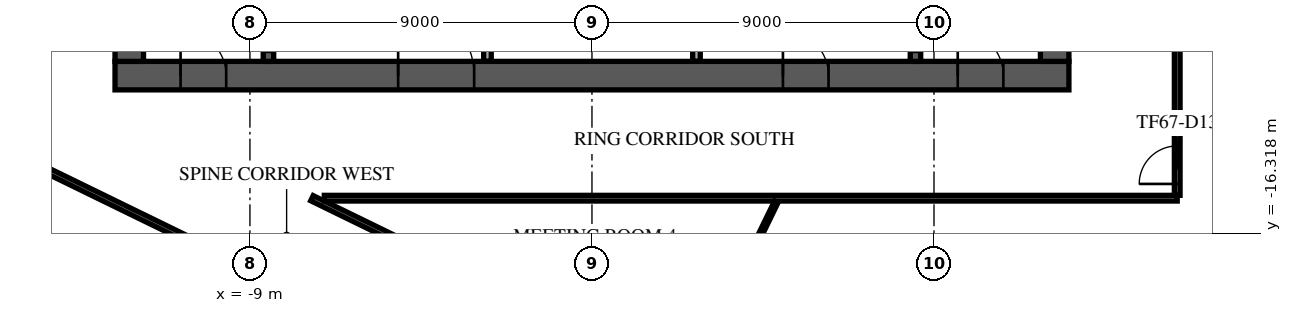
"""IFC4 building model, lengths in metres.
Left out: names, types, materials, properties, quantities, classifications, styles, units other than length and angle.
Written with IfcOpenShell. Run it as: python <this file> out.ifc"""

import sys

from ifc_helpers import new_model, si_unit, direction, frame, frame_2d, origin, place, context, subcontext, project, spatial, rectangle, extrude, element, fill, save


model = new_model("IFC4")
c1 = context("Model", 3, precision=1e-05, world=origin(), true_north=direction((0.0, 1.0)))
c2 = subcontext(c1, "Body", "Model", "MODEL_VIEW")
j1 = project(units=[si_unit("LENGTHUNIT", "METRE"), si_unit("PLANEANGLEUNIT", "RADIAN")], contexts=[c1])
p1 = place(None, origin())
s1 = spatial("IfcSite", under=j1, at=p1, CompositionType="ELEMENT")
p2 = place(p1, origin())
s2 = spatial("IfcBuilding", under=s1, at=p2, CompositionType="ELEMENT")
p3 = place(p2, frame((0.0, 0.0, 282.9)))
s3 = spatial("IfcBuildingStorey", under=s2, at=p3, CompositionType="ELEMENT", Elevation=282.9)
p4 = place(p3, frame((-12.55, -12.175, 0.0), z_axis=(0.0, 0.0, 1.0), x_axis=(1.0, 0.0, 0.0)))
e1 = element("IfcWall", 1, at=p4, inside=s3, PredefinedType="SHEAR", context=c2, shape_type="SweptSolid", body=[
    extrude(rectangle(XDim=25.1, YDim=0.75, at=frame_2d((12.55, 0.0))), origin(), (0.0, 0.0, 1.0), 3.64),
])
p5 = place(p4, frame((7.45, 0.0, 0.0)))
e2 = element("IfcOpeningElement", 2, at=p5, cuts=e1, PredefinedType="OPENING", context=c2, shape_type="SweptSolid", body=[
    extrude(rectangle(XDim=2.0, YDim=2.1, at=frame_2d((1.0, 1.05))), frame((0.0, 0.385, 0.0), z_axis=(0.0, -1.0, 0.0), x_axis=(1.0, 0.0, 0.0)), (0.0, 0.0, 1.0), 0.77),
])
p6 = place(p4, frame((17.575, 0.0, 0.0)))
e3 = element("IfcOpeningElement", 3, at=p6, cuts=e1, PredefinedType="OPENING", context=c2, shape_type="SweptSolid", body=[
    extrude(rectangle(XDim=1.2, YDim=2.1, at=frame_2d((0.6, 1.05))), frame((0.0, 0.385, 0.0), z_axis=(0.0, -1.0, 0.0), x_axis=(1.0, 0.0, 0.0)), (0.0, 0.0, 1.0), 0.77),
])
p7 = place(p4, frame((1.725, 0.0, 0.0)))
e4 = element("IfcOpeningElement", 4, at=p7, cuts=e1, PredefinedType="OPENING", context=c2, shape_type="SweptSolid", body=[
    extrude(rectangle(XDim=1.2, YDim=2.1, at=frame_2d((0.6, 1.05))), frame((0.0, 0.385, 0.0), z_axis=(0.0, -1.0, 0.0), x_axis=(1.0, 0.0, 0.0)), (0.0, 0.0, 1.0), 0.77),
])
p8 = place(p4, frame((22.175, 0.0, 0.0)))
e5 = element("IfcOpeningElement", 5, at=p8, cuts=e1, PredefinedType="OPENING", context=c2, shape_type="SweptSolid", body=[
    extrude(rectangle(XDim=1.2, YDim=2.1, at=frame_2d((0.6, 1.05))), frame((0.0, 0.385, 0.0), z_axis=(0.0, -1.0, 0.0), x_axis=(1.0, 0.0, 0.0)), (0.0, 0.0, 1.0), 0.77),
])
p9 = place(p3, frame((12.175, -11.8, 0.0), z_axis=(0.0, 0.0, 1.0), x_axis=(0.0, 1.0, 0.0)))
e6 = element("IfcWall", 6, at=p9, inside=s3, PredefinedType="SHEAR", context=c2, shape_type="SweptSolid", body=[
    extrude(rectangle(XDim=23.6, YDim=0.75, at=frame_2d((11.8, 0.0))), origin(), (0.0, 0.0, 1.0), 3.64),
])
p10 = place(p9, frame((10.6, 0.0, 0.0)))
e7 = element("IfcOpeningElement", 7, at=p10, cuts=e6, PredefinedType="OPENING", context=c2, shape_type="SweptSolid", body=[
    extrude(rectangle(XDim=2.4, YDim=2.4, at=frame_2d((1.2, 1.2))), frame((0.0, 0.385, 0.0), z_axis=(0.0, -1.0, 0.0), x_axis=(1.0, 0.0, 0.0)), (0.0, 0.0, 1.0), 0.77),
])
p11 = place(p3, frame((-12.175, -11.8, 0.0), z_axis=(0.0, 0.0, 1.0), x_axis=(0.0, 1.0, 0.0)))
e8 = element("IfcWall", 8, at=p11, inside=s3, PredefinedType="SHEAR", context=c2, shape_type="SweptSolid", body=[
    extrude(rectangle(XDim=23.6, YDim=0.75, at=frame_2d((11.8, 0.0))), origin(), (0.0, 0.0, 1.0), 3.64),
])
p12 = place(p11, frame((10.6, 0.0, 0.0)))
e9 = element("IfcOpeningElement", 9, at=p12, cuts=e8, PredefinedType="OPENING", context=c2, shape_type="SweptSolid", body=[
    extrude(rectangle(XDim=2.4, YDim=2.4, at=frame_2d((1.2, 1.2))), frame((0.0, 0.385, 0.0), z_axis=(0.0, -1.0, 0.0), x_axis=(1.0, 0.0, 0.0)), (0.0, 0.0, 1.0), 0.77),
])
p13 = place(p3, frame((-8.512, -4.55, 0.0), z_axis=(0.0, 0.0, 1.0), x_axis=(0.0, -1.0, 0.0)))
e10 = element("IfcWall", 10, at=p13, inside=s3, PredefinedType="SOLIDWALL", context=c2, shape_type="SweptSolid", body=[
    extrude(rectangle(XDim=7.25, YDim=0.275, at=frame_2d((3.625, 0.0))), origin(), (0.0, 0.0, 1.0), 3.64),
])
p14 = place(p13, frame((6.0, 0.0, 0.0)))
e11 = element("IfcOpeningElement", 11, at=p14, cuts=e10, PredefinedType="OPENING", context=c2, shape_type="SweptSolid", body=[
    extrude(rectangle(XDim=1.0, YDim=2.1, at=frame_2d((0.5, 1.05))), frame((0.0, 0.147, 0.0), z_axis=(0.0, -1.0, 0.0), x_axis=(1.0, 0.0, 0.0)), (0.0, 0.0, 1.0), 0.295),
])
p15 = place(p3, frame((8.512, -4.55, 0.0), z_axis=(0.0, 0.0, 1.0), x_axis=(0.0, -1.0, 0.0)))
e12 = element("IfcWall", 12, at=p15, inside=s3, PredefinedType="SOLIDWALL", context=c2, shape_type="SweptSolid", body=[
    extrude(rectangle(XDim=7.25, YDim=0.275, at=frame_2d((3.625, 0.0))), origin(), (0.0, 0.0, 1.0), 3.64),
])
p16 = place(p15, frame((6.0, 0.0, 0.0)))
e13 = element("IfcOpeningElement", 13, at=p16, cuts=e12, PredefinedType="OPENING", context=c2, shape_type="SweptSolid", body=[
    extrude(rectangle(XDim=1.0, YDim=2.1, at=frame_2d((0.5, 1.05))), frame((0.0, 0.147, 0.0), z_axis=(0.0, -1.0, 0.0), x_axis=(1.0, 0.0, 0.0)), (0.0, 0.0, 1.0), 0.295),
])
p17 = place(p3, frame((-2.75, -11.795, 0.0), z_axis=(0.0, 0.0, 1.0), x_axis=(0.0, 1.0, 0.0)))
e14 = element("IfcWall", 14, at=p17, inside=s3, PredefinedType="PARTITIONING", context=c2, shape_type="SweptSolid", body=[
    extrude(rectangle(XDim=2.99, YDim=0.2, at=frame_2d((1.495, 0.0))), origin(), (0.0, 0.0, 1.0), 3.64),
])
p18 = place(p17, frame((0.657, 0.0, 0.0)))
e15 = element("IfcOpeningElement", 15, at=p18, cuts=e14, PredefinedType="OPENING", context=c2, shape_type="SweptSolid", body=[
    extrude(rectangle(XDim=1.8, YDim=2.1, at=frame_2d((0.9, 1.05))), frame((0.0, 0.11, 0.0), z_axis=(0.0, -1.0, 0.0), x_axis=(1.0, 0.0, 0.0)), (0.0, 0.0, 1.0), 0.22),
])
p19 = place(p3, frame((2.75, -11.795, 0.0), z_axis=(0.0, 0.0, 1.0), x_axis=(0.0, 1.0, 0.0)))
e16 = element("IfcWall", 16, at=p19, inside=s3, PredefinedType="PARTITIONING", context=c2, shape_type="SweptSolid", body=[
    extrude(rectangle(XDim=2.99, YDim=0.2, at=frame_2d((1.495, 0.0))), origin(), (0.0, 0.0, 1.0), 3.64),
])
p20 = place(p3, frame((-10.292, 32.278, 0.0), z_axis=(0.0, 0.0, 1.0), x_axis=(-0.438370550468, -0.898794337144, 0.0)))
e17 = element("IfcWall", 17, at=p20, inside=s3, PredefinedType="STANDARD", context=c2, shape_type="SweptSolid", body=[
    extrude(rectangle(XDim=48.843, YDim=0.6, at=frame_2d((24.421, 0.0))), origin(), (0.0, 0.0, 1.0), 3.64),
])
p21 = place(p20, frame((1.22, 0.0, 0.9)))
e18 = element("IfcOpeningElement", 18, at=p21, cuts=e17, PredefinedType="OPENING", context=c2, shape_type="SweptSolid", body=[
    extrude(rectangle(XDim=2.0, YDim=2.1, at=frame_2d((1.0, 1.05))), frame((0.0, 0.31, 0.0), z_axis=(0.0, -1.0, 0.0), x_axis=(1.0, 0.0, 0.0)), (0.0, 0.0, 1.0), 0.62),
])
p22 = place(p20, frame((5.66, 0.0, 0.9)))
e19 = element("IfcOpeningElement", 19, at=p22, cuts=e17, PredefinedType="OPENING", context=c2, shape_type="SweptSolid", body=[
    extrude(rectangle(XDim=2.0, YDim=2.1, at=frame_2d((1.0, 1.05))), frame((0.0, 0.31, 0.0), z_axis=(0.0, -1.0, 0.0), x_axis=(1.0, 0.0, 0.0)), (0.0, 0.0, 1.0), 0.62),
])
p23 = place(p20, frame((10.101, 0.0, 0.9)))
e20 = element("IfcOpeningElement", 20, at=p23, cuts=e17, PredefinedType="OPENING", context=c2, shape_type="SweptSolid", body=[
    extrude(rectangle(XDim=2.0, YDim=2.1, at=frame_2d((1.0, 1.05))), frame((0.0, 0.31, 0.0), z_axis=(0.0, -1.0, 0.0), x_axis=(1.0, 0.0, 0.0)), (0.0, 0.0, 1.0), 0.62),
])
p24 = place(p20, frame((14.541, 0.0, 0.9)))
e21 = element("IfcOpeningElement", 21, at=p24, cuts=e17, PredefinedType="OPENING", context=c2, shape_type="SweptSolid", body=[
    extrude(rectangle(XDim=2.0, YDim=2.1, at=frame_2d((1.0, 1.05))), frame((0.0, 0.31, 0.0), z_axis=(0.0, -1.0, 0.0), x_axis=(1.0, 0.0, 0.0)), (0.0, 0.0, 1.0), 0.62),
])
p25 = place(p20, frame((18.981, 0.0, 0.9)))
e22 = element("IfcOpeningElement", 22, at=p25, cuts=e17, PredefinedType="OPENING", context=c2, shape_type="SweptSolid", body=[
    extrude(rectangle(XDim=2.0, YDim=2.1, at=frame_2d((1.0, 1.05))), frame((0.0, 0.31, 0.0), z_axis=(0.0, -1.0, 0.0), x_axis=(1.0, 0.0, 0.0)), (0.0, 0.0, 1.0), 0.62),
])
p26 = place(p20, frame((23.422, 0.0, 0.9)))
e23 = element("IfcOpeningElement", 23, at=p26, cuts=e17, PredefinedType="OPENING", context=c2, shape_type="SweptSolid", body=[
    extrude(rectangle(XDim=2.0, YDim=2.1, at=frame_2d((1.0, 1.05))), frame((0.0, 0.31, 0.0), z_axis=(0.0, -1.0, 0.0), x_axis=(1.0, 0.0, 0.0)), (0.0, 0.0, 1.0), 0.62),
])
p27 = place(p20, frame((27.862, 0.0, 0.9)))
e24 = element("IfcOpeningElement", 24, at=p27, cuts=e17, PredefinedType="OPENING", context=c2, shape_type="SweptSolid", body=[
    extrude(rectangle(XDim=2.0, YDim=2.1, at=frame_2d((1.0, 1.05))), frame((0.0, 0.31, 0.0), z_axis=(0.0, -1.0, 0.0), x_axis=(1.0, 0.0, 0.0)), (0.0, 0.0, 1.0), 0.62),
])
p28 = place(p20, frame((32.302, 0.0, 0.9)))
e25 = element("IfcOpeningElement", 25, at=p28, cuts=e17, PredefinedType="OPENING", context=c2, shape_type="SweptSolid", body=[
    extrude(rectangle(XDim=2.0, YDim=2.1, at=frame_2d((1.0, 1.05))), frame((0.0, 0.31, 0.0), z_axis=(0.0, -1.0, 0.0), x_axis=(1.0, 0.0, 0.0)), (0.0, 0.0, 1.0), 0.62),
])
p29 = place(p20, frame((36.742, 0.0, 0.9)))
e26 = element("IfcOpeningElement", 26, at=p29, cuts=e17, PredefinedType="OPENING", context=c2, shape_type="SweptSolid", body=[
    extrude(rectangle(XDim=2.0, YDim=2.1, at=frame_2d((1.0, 1.05))), frame((0.0, 0.31, 0.0), z_axis=(0.0, -1.0, 0.0), x_axis=(1.0, 0.0, 0.0)), (0.0, 0.0, 1.0), 0.62),
])
p30 = place(p20, frame((41.183, 0.0, 0.9)))
e27 = element("IfcOpeningElement", 27, at=p30, cuts=e17, PredefinedType="OPENING", context=c2, shape_type="SweptSolid", body=[
    extrude(rectangle(XDim=2.0, YDim=2.1, at=frame_2d((1.0, 1.05))), frame((0.0, 0.31, 0.0), z_axis=(0.0, -1.0, 0.0), x_axis=(1.0, 0.0, 0.0)), (0.0, 0.0, 1.0), 0.62),
])
p31 = place(p20, frame((45.623, 0.0, 0.9)))
e28 = element("IfcOpeningElement", 28, at=p31, cuts=e17, PredefinedType="OPENING", context=c2, shape_type="SweptSolid", body=[
    extrude(rectangle(XDim=2.0, YDim=2.1, at=frame_2d((1.0, 1.05))), frame((0.0, 0.31, 0.0), z_axis=(0.0, -1.0, 0.0), x_axis=(1.0, 0.0, 0.0)), (0.0, 0.0, 1.0), 0.62),
])
p32 = place(p3, frame((10.36, -32.137, 0.0), z_axis=(0.0, 0.0, 1.0), x_axis=(0.438372256832, 0.898793504894, 0.0)))
e29 = element("IfcWall", 29, at=p32, inside=s3, PredefinedType="STANDARD", context=c2, shape_type="SweptSolid", body=[
    extrude(rectangle(XDim=48.687, YDim=0.6, at=frame_2d((24.343, 0.0))), origin(), (0.0, 0.0, 1.0), 3.64),
])
p33 = place(p32, frame((1.213, 0.0, 0.9)))
e30 = element("IfcOpeningElement", 30, at=p33, cuts=e29, PredefinedType="OPENING", context=c2, shape_type="SweptSolid", body=[
    extrude(rectangle(XDim=2.0, YDim=2.1, at=frame_2d((1.0, 1.05))), frame((0.0, 0.31, 0.0), z_axis=(0.0, -1.0, 0.0), x_axis=(1.0, 0.0, 0.0)), (0.0, 0.0, 1.0), 0.62),
])
p34 = place(p32, frame((5.639, 0.0, 0.9)))
e31 = element("IfcOpeningElement", 31, at=p34, cuts=e29, PredefinedType="OPENING", context=c2, shape_type="SweptSolid", body=[
    extrude(rectangle(XDim=2.0, YDim=2.1, at=frame_2d((1.0, 1.05))), frame((0.0, 0.31, 0.0), z_axis=(0.0, -1.0, 0.0), x_axis=(1.0, 0.0, 0.0)), (0.0, 0.0, 1.0), 0.62),
])
p35 = place(p32, frame((10.065, 0.0, 0.9)))
e32 = element("IfcOpeningElement", 32, at=p35, cuts=e29, PredefinedType="OPENING", context=c2, shape_type="SweptSolid", body=[
    extrude(rectangle(XDim=2.0, YDim=2.1, at=frame_2d((1.0, 1.05))), frame((0.0, 0.31, 0.0), z_axis=(0.0, -1.0, 0.0), x_axis=(1.0, 0.0, 0.0)), (0.0, 0.0, 1.0), 0.62),
])
p36 = place(p32, frame((14.491, 0.0, 0.9)))
e33 = element("IfcOpeningElement", 33, at=p36, cuts=e29, PredefinedType="OPENING", context=c2, shape_type="SweptSolid", body=[
    extrude(rectangle(XDim=2.0, YDim=2.1, at=frame_2d((1.0, 1.05))), frame((0.0, 0.31, 0.0), z_axis=(0.0, -1.0, 0.0), x_axis=(1.0, 0.0, 0.0)), (0.0, 0.0, 1.0), 0.62),
])
p37 = place(p32, frame((18.917, 0.0, 0.9)))
e34 = element("IfcOpeningElement", 34, at=p37, cuts=e29, PredefinedType="OPENING", context=c2, shape_type="SweptSolid", body=[
    extrude(rectangle(XDim=2.0, YDim=2.1, at=frame_2d((1.0, 1.05))), frame((0.0, 0.31, 0.0), z_axis=(0.0, -1.0, 0.0), x_axis=(1.0, 0.0, 0.0)), (0.0, 0.0, 1.0), 0.62),
])
p38 = place(p32, frame((23.343, 0.0, 0.9)))
e35 = element("IfcOpeningElement", 35, at=p38, cuts=e29, PredefinedType="OPENING", context=c2, shape_type="SweptSolid", body=[
    extrude(rectangle(XDim=2.0, YDim=2.1, at=frame_2d((1.0, 1.05))), frame((0.0, 0.31, 0.0), z_axis=(0.0, -1.0, 0.0), x_axis=(1.0, 0.0, 0.0)), (0.0, 0.0, 1.0), 0.62),
])
p39 = place(p32, frame((27.769, 0.0, 0.9)))
e36 = element("IfcOpeningElement", 36, at=p39, cuts=e29, PredefinedType="OPENING", context=c2, shape_type="SweptSolid", body=[
    extrude(rectangle(XDim=2.0, YDim=2.1, at=frame_2d((1.0, 1.05))), frame((0.0, 0.31, 0.0), z_axis=(0.0, -1.0, 0.0), x_axis=(1.0, 0.0, 0.0)), (0.0, 0.0, 1.0), 0.62),
])
p40 = place(p32, frame((32.195, 0.0, 0.9)))
e37 = element("IfcOpeningElement", 37, at=p40, cuts=e29, PredefinedType="OPENING", context=c2, shape_type="SweptSolid", body=[
    extrude(rectangle(XDim=2.0, YDim=2.1, at=frame_2d((1.0, 1.05))), frame((0.0, 0.31, 0.0), z_axis=(0.0, -1.0, 0.0), x_axis=(1.0, 0.0, 0.0)), (0.0, 0.0, 1.0), 0.62),
])
p41 = place(p32, frame((36.621, 0.0, 0.9)))
e38 = element("IfcOpeningElement", 38, at=p41, cuts=e29, PredefinedType="OPENING", context=c2, shape_type="SweptSolid", body=[
    extrude(rectangle(XDim=2.0, YDim=2.1, at=frame_2d((1.0, 1.05))), frame((0.0, 0.31, 0.0), z_axis=(0.0, -1.0, 0.0), x_axis=(1.0, 0.0, 0.0)), (0.0, 0.0, 1.0), 0.62),
])
p42 = place(p32, frame((41.047, 0.0, 0.9)))
e39 = element("IfcOpeningElement", 39, at=p42, cuts=e29, PredefinedType="OPENING", context=c2, shape_type="SweptSolid", body=[
    extrude(rectangle(XDim=2.0, YDim=2.1, at=frame_2d((1.0, 1.05))), frame((0.0, 0.31, 0.0), z_axis=(0.0, -1.0, 0.0), x_axis=(1.0, 0.0, 0.0)), (0.0, 0.0, 1.0), 0.62),
])
p43 = place(p32, frame((45.473, 0.0, 0.9)))
e40 = element("IfcOpeningElement", 40, at=p43, cuts=e29, PredefinedType="OPENING", context=c2, shape_type="SweptSolid", body=[
    extrude(rectangle(XDim=2.0, YDim=2.1, at=frame_2d((1.0, 1.05))), frame((0.0, 0.31, 0.0), z_axis=(0.0, -1.0, 0.0), x_axis=(1.0, 0.0, 0.0)), (0.0, 0.0, 1.0), 0.62),
])
p44 = place(p3, frame((-26.175, -8.898, 0.0), z_axis=(0.0, 0.0, 1.0), x_axis=(0.898795233888, -0.438368711864, 0.0)))
e41 = element("IfcWall", 41, at=p44, inside=s3, PredefinedType="PARTITIONING", context=c2, shape_type="SweptSolid", body=[
    extrude(rectangle(XDim=39.325, YDim=0.15, at=frame_2d((19.663, 0.0))), origin(), (0.0, 0.0, 1.0), 3.04),
])
p45 = place(p44, frame((5.8, 0.0, 0.0)))
e42 = element("IfcOpeningElement", 42, at=p45, cuts=e41, PredefinedType="OPENING", context=c2, shape_type="SweptSolid", body=[
    extrude(rectangle(XDim=1.8, YDim=2.1, at=frame_2d((0.9, 1.05))), frame((0.0, 0.085, 0.0), z_axis=(0.0, -1.0, 0.0), x_axis=(1.0, 0.0, 0.0)), (0.0, 0.0, 1.0), 0.17),
])
p46 = place(p44, frame((10.827, 0.0, 0.0)))
e43 = element("IfcOpeningElement", 43, at=p46, cuts=e41, PredefinedType="OPENING", context=c2, shape_type="SweptSolid", body=[
    extrude(rectangle(XDim=1.0, YDim=2.1, at=frame_2d((0.5, 1.05))), frame((0.0, 0.085, 0.0), z_axis=(0.0, -1.0, 0.0), x_axis=(1.0, 0.0, 0.0)), (0.0, 0.0, 1.0), 0.17),
])
p47 = place(p44, frame((23.556, 0.0, 0.0)))
e44 = element("IfcOpeningElement", 44, at=p47, cuts=e41, PredefinedType="OPENING", context=c2, shape_type="SweptSolid", body=[
    extrude(rectangle(XDim=1.0, YDim=2.1, at=frame_2d((0.5, 1.05))), frame((0.0, 0.085, 0.0), z_axis=(0.0, -1.0, 0.0), x_axis=(1.0, 0.0, 0.0)), (0.0, 0.0, 1.0), 0.17),
])
p48 = place(p3, frame((-7.368, -15.4, 0.0), z_axis=(0.0, 0.0, 1.0), x_axis=(0.898784749485, -0.438390207571, 0.0)))
e45 = element("IfcWall", 45, at=p48, inside=s3, PredefinedType="PARTITIONING", context=c2, shape_type="SweptSolid", body=[
    extrude(rectangle(XDim=19.572, YDim=0.15, at=frame_2d((9.786, 0.0))), origin(), (0.0, 0.0, 1.0), 3.04),
])
p49 = place(p48, frame((6.8, 0.0, 0.0)))
e46 = element("IfcOpeningElement", 46, at=p49, cuts=e45, PredefinedType="OPENING", context=c2, shape_type="SweptSolid", body=[
    extrude(rectangle(XDim=1.0, YDim=2.1, at=frame_2d((0.5, 1.05))), frame((0.0, 0.085, 0.0), z_axis=(0.0, -1.0, 0.0), x_axis=(1.0, 0.0, 0.0)), (0.0, 0.0, 1.0), 0.17),
])
p50 = place(p48, frame((11.324, 0.0, 0.0)))
e47 = element("IfcOpeningElement", 47, at=p50, cuts=e45, PredefinedType="OPENING", context=c2, shape_type="SweptSolid", body=[
    extrude(rectangle(XDim=1.8, YDim=2.1, at=frame_2d((0.9, 1.05))), frame((0.0, 0.085, 0.0), z_axis=(0.0, -1.0, 0.0), x_axis=(1.0, 0.0, 0.0)), (0.0, 0.0, 1.0), 0.17),
])
p51 = place(p3, frame((-7.043, -15.4, 0.0), z_axis=(0.0, 0.0, 1.0), x_axis=(1.0, 0.0, 0.0)))
e48 = element("IfcWall", 48, at=p51, inside=s3, PredefinedType="PARTITIONING", context=c2, shape_type="SweptSolid", body=[
    extrude(rectangle(XDim=22.443, YDim=0.15, at=frame_2d((11.222, 0.0))), origin(), (0.0, 0.0, 1.0), 3.24),
])
p52 = place(p3, frame((15.4, -15.325, 0.0), z_axis=(0.0, 0.0, 1.0), x_axis=(0.0, 1.0, 0.0)))
e49 = element("IfcWall", 49, at=p52, inside=s3, PredefinedType="PARTITIONING", context=c2, shape_type="SweptSolid", body=[
    extrude(rectangle(XDim=26.808, YDim=0.15, at=frame_2d((13.404, 0.0))), origin(), (0.0, 0.0, 1.0), 3.24),
])
p53 = place(p52, frame((0.3, 0.0, 0.0)))
e50 = element("IfcOpeningElement", 50, at=p53, cuts=e49, PredefinedType="OPENING", context=c2, shape_type="SweptSolid", body=[
    extrude(rectangle(XDim=1.0, YDim=2.1, at=frame_2d((0.5, 1.05))), frame((0.0, 0.085, 0.0), z_axis=(0.0, -1.0, 0.0), x_axis=(1.0, 0.0, 0.0)), (0.0, 0.0, 1.0), 0.17),
])
p54 = place(p52, frame((14.072, 0.0, 0.0)))
e51 = element("IfcOpeningElement", 51, at=p54, cuts=e49, PredefinedType="OPENING", context=c2, shape_type="SweptSolid", body=[
    extrude(rectangle(XDim=1.0, YDim=2.1, at=frame_2d((0.5, 1.05))), frame((0.0, 0.085, 0.0), z_axis=(0.0, -1.0, 0.0), x_axis=(1.0, 0.0, 0.0)), (0.0, 0.0, 1.0), 0.17),
])
p55 = place(p3, frame((2.573, -20.166, 0.0), z_axis=(0.0, 0.0, 1.0), x_axis=(0.438298611435, 0.898829420532, 0.0)))
e52 = element("IfcWall", 52, at=p55, inside=s3, PredefinedType="PARTITIONING", context=c2, shape_type="SweptSolid", body=[
    extrude(rectangle(XDim=5.194, YDim=0.1, at=frame_2d((2.597, 0.0))), origin(), (0.0, 0.0, 1.0), 3.24),
])
p56 = place(p5, origin())
e53 = element("IfcDoor", 53, at=p56, inside=s3, OperationType="SINGLE_SWING_LEFT", PredefinedType="DOOR", context=c2, shape_type="SweptSolid", body=[
    extrude(rectangle(XDim=2.0, YDim=2.1, at=frame_2d((1.0, 1.05))), frame((0.0, 0.025, 0.0), z_axis=(0.0, -1.0, 0.0), x_axis=(1.0, 0.0, 0.0)), (0.0, 0.0, 1.0), 0.05),
])
fill(e2, e53)
p57 = place(p6, origin())
e54 = element("IfcDoor", 54, at=p57, inside=s3, OperationType="SINGLE_SWING_LEFT", PredefinedType="DOOR", context=c2, shape_type="SweptSolid", body=[
    extrude(rectangle(XDim=1.2, YDim=2.1, at=frame_2d((0.6, 1.05))), frame((0.0, 0.025, 0.0), z_axis=(0.0, -1.0, 0.0), x_axis=(1.0, 0.0, 0.0)), (0.0, 0.0, 1.0), 0.05),
])
fill(e3, e54)
p58 = place(p7, origin())
e55 = element("IfcDoor", 55, at=p58, inside=s3, OperationType="SINGLE_SWING_LEFT", PredefinedType="DOOR", context=c2, shape_type="SweptSolid", body=[
    extrude(rectangle(XDim=1.2, YDim=2.1, at=frame_2d((0.6, 1.05))), frame((0.0, 0.025, 0.0), z_axis=(0.0, -1.0, 0.0), x_axis=(1.0, 0.0, 0.0)), (0.0, 0.0, 1.0), 0.05),
])
fill(e4, e55)
p59 = place(p8, origin())
e56 = element("IfcDoor", 56, at=p59, inside=s3, OperationType="SINGLE_SWING_LEFT", PredefinedType="DOOR", context=c2, shape_type="SweptSolid", body=[
    extrude(rectangle(XDim=1.2, YDim=2.1, at=frame_2d((0.6, 1.05))), frame((0.0, 0.025, 0.0), z_axis=(0.0, -1.0, 0.0), x_axis=(1.0, 0.0, 0.0)), (0.0, 0.0, 1.0), 0.05),
])
fill(e5, e56)
p60 = place(p53, frame((1.0, 0.0, 0.0), z_axis=(0.0, 0.0, 1.0), x_axis=(-1.0, 0.0, 0.0)))
e57 = element("IfcDoor", 57, at=p60, inside=s3, OperationType="SINGLE_SWING_RIGHT", PredefinedType="DOOR", context=c2, shape_type="SweptSolid", body=[
    extrude(rectangle(XDim=1.0, YDim=2.1, at=frame_2d((0.5, 1.05))), frame((0.0, 0.025, 0.0), z_axis=(0.0, -1.0, 0.0), x_axis=(1.0, 0.0, 0.0)), (0.0, 0.0, 1.0), 0.05),
])
fill(e50, e57)
save(model, sys.argv[1])
